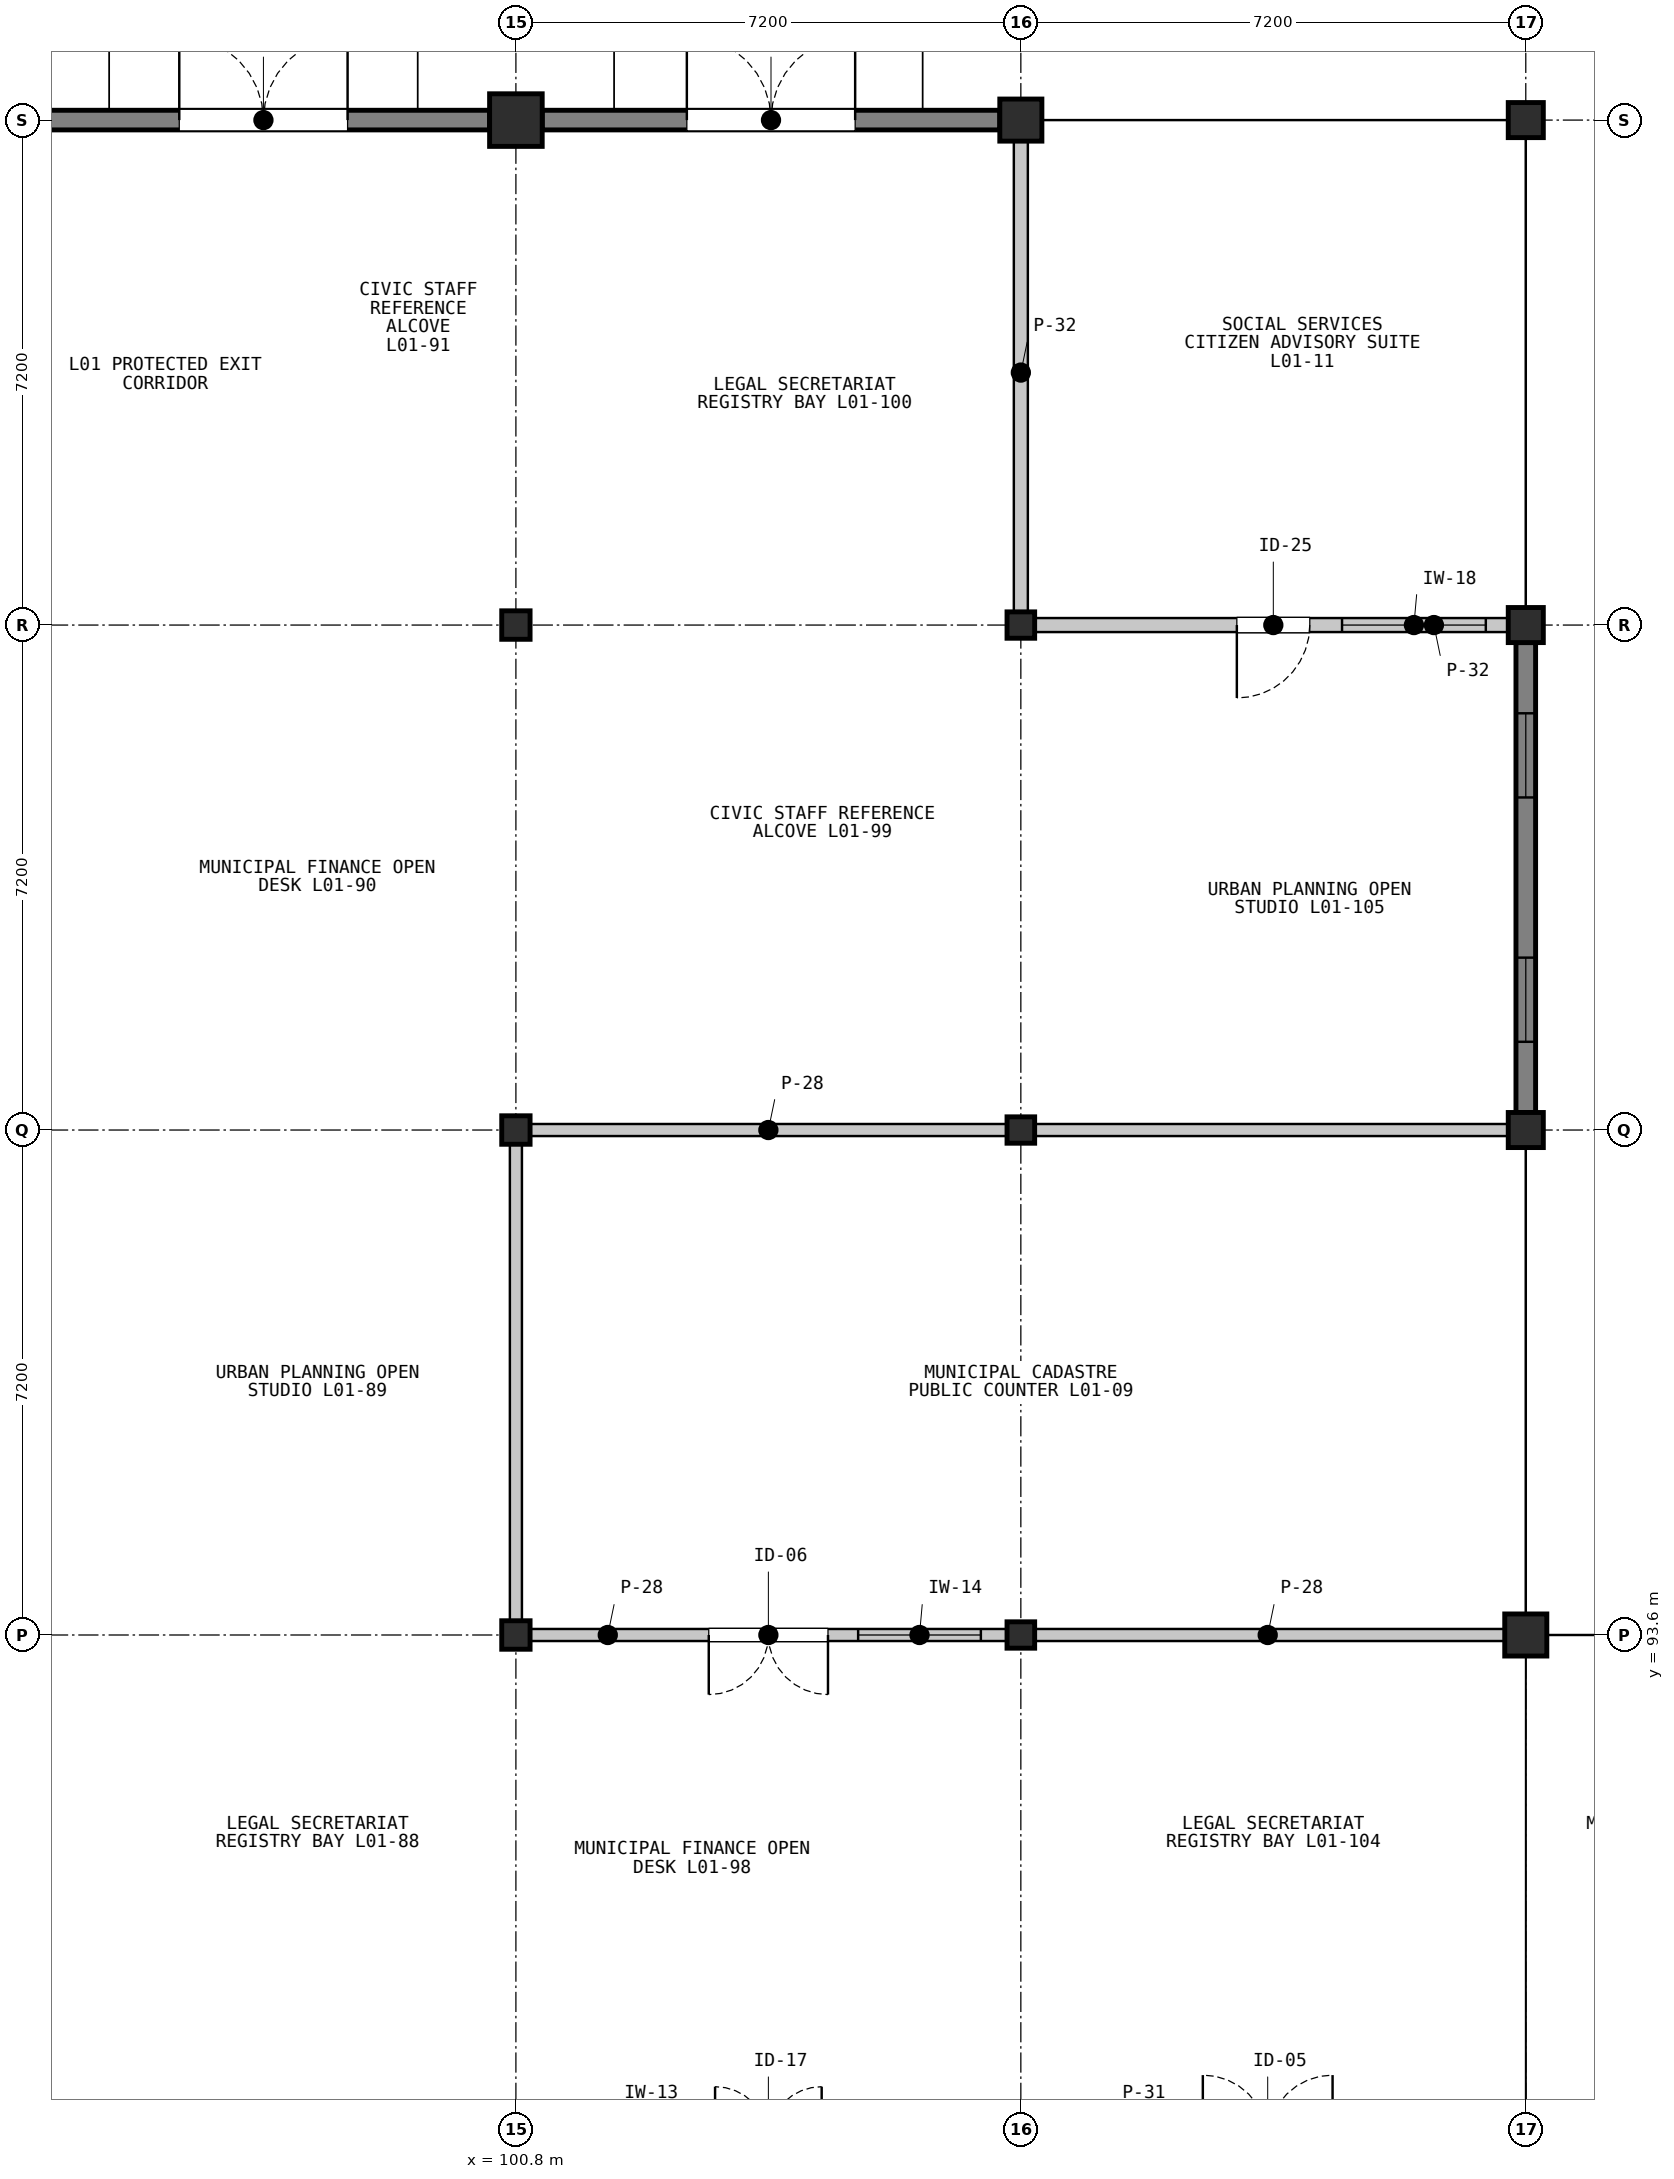
"""IFC4 building model, lengths in metres.
Left out: names, types, materials, properties, quantities, classifications, styles, units other than length and angle.
Written with IfcOpenShell. Run it as: python <this file> out.ifc"""

import sys

from ifc_helpers import new_model, si_unit, direction, frame, frame_2d, origin, origin_2d, place, context, subcontext, project, spatial, rectangle, i_section, extrude, element, fill, save


model = new_model("IFC4")
c1 = context("Model", 3, precision=1e-05, world=origin(), true_north=direction((0.0, 1.0)))
c2 = subcontext(c1, "Body", "Model", "MODEL_VIEW")
j1 = project(units=[si_unit("LENGTHUNIT", "METRE"), si_unit("PLANEANGLEUNIT", "RADIAN")], contexts=[c1])
p1 = place(None, origin())
s1 = spatial("IfcSite", under=j1, at=p1, CompositionType="ELEMENT")
p2 = place(p1, origin())
s2 = spatial("IfcBuilding", under=s1, at=p2, CompositionType="ELEMENT")
p3 = place(p2, origin())
s3 = spatial("IfcBuildingStorey", under=s2, at=p3, CompositionType="ELEMENT", Elevation=0.0)
for number, where, z_axis, x_axis in (
    (1, (100.8, 93.6, 0.0), (0.0, 0.0, 1.0), (1.0, 0.0, 0.0)),
    (2, (100.8, 100.8, 0.0), (0.0, 0.0, 1.0), (1.0, 0.0, 0.0)),
    (3, (100.8, 108.0, 0.0), (0.0, 0.0, 1.0), (1.0, 0.0, 0.0)),
):
    element("IfcColumn", number, at=place(p3, frame(where, z_axis=z_axis, x_axis=x_axis)), inside=s3, PredefinedType="COLUMN", context=c2, shape_type="SweptSolid", body=[
        extrude(i_section(OverallWidth=0.404, OverallDepth=0.406, WebThickness=0.027, FlangeThickness=0.044, FilletRadius=0.015, at=origin_2d()), origin(), (0.0, 0.0, 1.0), 5.4),
    ])
p4 = place(p3, frame((100.8, 115.2, 0.0), z_axis=(0.0, 0.0, 1.0), x_axis=(1.0, 0.0, 0.0)))
e4 = element("IfcColumn", 4, at=p4, inside=s3, PredefinedType="COLUMN", context=c2, shape_type="SweptSolid", body=[
    extrude(rectangle(XDim=0.75, YDim=0.75, at=origin_2d()), origin(), (0.0, 0.0, 1.0), 5.4),
])
for number, where, z_axis, x_axis in (
    (5, (108.0, 93.6, 0.0), (0.0, 0.0, 1.0), (1.0, 0.0, 0.0)),
    (6, (108.0, 100.8, 0.0), (0.0, 0.0, 1.0), (1.0, 0.0, 0.0)),
    (7, (108.0, 108.0, 0.0), (0.0, 0.0, 1.0), (1.0, 0.0, 0.0)),
):
    element("IfcColumn", number, at=place(p3, frame(where, z_axis=z_axis, x_axis=x_axis)), inside=s3, PredefinedType="COLUMN", context=c2, shape_type="SweptSolid", body=[
        extrude(i_section(OverallWidth=0.394, OverallDepth=0.376, WebThickness=0.017, FlangeThickness=0.028, FilletRadius=0.015, at=origin_2d()), origin(), (0.0, 0.0, 1.0), 5.4),
    ])
for number, where, z_axis, x_axis in (
    (8, (108.0, 115.2, 0.0), (0.0, 0.0, 1.0), (1.0, 0.0, 0.0)),
    (9, (115.2, 93.6, 0.0), (0.0, 0.0, 1.0), (1.0, 0.0, 0.0)),
):
    element("IfcColumn", number, at=place(p3, frame(where, z_axis=z_axis, x_axis=x_axis)), inside=s3, PredefinedType="COLUMN", context=c2, shape_type="SweptSolid", body=[
        extrude(rectangle(XDim=0.6, YDim=0.6, at=origin_2d()), origin(), (0.0, 0.0, 1.0), 5.4),
    ])
for number, where, z_axis, x_axis in (
    (10, (115.2, 100.8, 0.0), (0.0, 0.0, 1.0), (1.0, 0.0, 0.0)),
    (11, (115.2, 108.0, 0.0), (0.0, 0.0, 1.0), (1.0, 0.0, 0.0)),
    (12, (115.2, 115.2, 0.0), (0.0, 0.0, 1.0), (1.0, 0.0, 0.0)),
):
    element("IfcColumn", number, at=place(p3, frame(where, z_axis=z_axis, x_axis=x_axis)), inside=s3, PredefinedType="COLUMN", context=c2, shape_type="SweptSolid", body=[
        extrude(rectangle(XDim=0.5, YDim=0.5, at=origin_2d()), origin(), (0.0, 0.0, 1.0), 5.4),
    ])
p5 = place(p3, frame((93.975, 115.2, 0.0), z_axis=(0.0, 0.0, 1.0), x_axis=(1.0, 0.0, 0.0)))
e13 = element("IfcWall", 13, at=p5, inside=s3, PredefinedType="SOLIDWALL", context=c2, shape_type="SweptSolid", body=[
    extrude(rectangle(XDim=6.45, YDim=0.28, at=frame_2d((3.225, 0.0))), origin(), (0.0, 0.0, 1.0), 4.598),
])
p6 = place(p5, frame((2.025, 0.0, 0.0)))
e14 = element("IfcOpeningElement", 14, at=p6, cuts=e13, PredefinedType="OPENING", context=c2, shape_type="SweptSolid", body=[
    extrude(rectangle(XDim=2.4, YDim=2.8, at=frame_2d((1.2, 1.4))), frame((0.0, 0.15, 0.0), z_axis=(0.0, -1.0, 0.0), x_axis=(1.0, 0.0, 0.0)), (0.0, 0.0, 1.0), 0.3),
])
p7 = place(p3, frame((101.175, 115.2, 0.0), z_axis=(0.0, 0.0, 1.0), x_axis=(1.0, 0.0, 0.0)))
e15 = element("IfcWall", 15, at=p7, inside=s3, PredefinedType="SOLIDWALL", context=c2, shape_type="SweptSolid", body=[
    extrude(rectangle(XDim=6.525, YDim=0.28, at=frame_2d((3.262, 0.0))), origin(), (0.0, 0.0, 1.0), 4.598),
])
p8 = place(p7, frame((2.062, 0.0, 0.0)))
e16 = element("IfcOpeningElement", 16, at=p8, cuts=e15, PredefinedType="OPENING", context=c2, shape_type="SweptSolid", body=[
    extrude(rectangle(XDim=2.4, YDim=2.8, at=frame_2d((1.2, 1.4))), frame((0.0, 0.15, 0.0), z_axis=(0.0, -1.0, 0.0), x_axis=(1.0, 0.0, 0.0)), (0.0, 0.0, 1.0), 0.3),
])
p9 = place(p3, frame((115.2, 107.75, 0.0), z_axis=(0.0, 0.0, 1.0), x_axis=(0.0, -1.0, 0.0)))
e17 = element("IfcWall", 17, at=p9, inside=s3, PredefinedType="SOLIDWALL", context=c2, shape_type="SweptSolid", body=[
    extrude(rectangle(XDim=6.7, YDim=0.28, at=frame_2d((3.35, 0.0))), origin(), (0.0, 0.0, 1.0), 4.667),
])
p10 = place(p9, frame((1.008, 0.0, 0.95)))
e18 = element("IfcOpeningElement", 18, at=p10, cuts=e17, PredefinedType="OPENING", context=c2, shape_type="SweptSolid", body=[
    extrude(rectangle(XDim=1.2, YDim=1.7, at=frame_2d((0.6, 0.85))), frame((0.0, 0.15, 0.0), z_axis=(0.0, -1.0, 0.0), x_axis=(1.0, 0.0, 0.0)), (0.0, 0.0, 1.0), 0.3),
])
p11 = place(p9, frame((4.492, 0.0, 0.95)))
e19 = element("IfcOpeningElement", 19, at=p11, cuts=e17, PredefinedType="OPENING", context=c2, shape_type="SweptSolid", body=[
    extrude(rectangle(XDim=1.2, YDim=1.7, at=frame_2d((0.6, 0.85))), frame((0.0, 0.15, 0.0), z_axis=(0.0, -1.0, 0.0), x_axis=(1.0, 0.0, 0.0)), (0.0, 0.0, 1.0), 0.3),
])
p12 = place(p3, frame((107.88, 93.6, 0.0), z_axis=(0.0, 0.0, 1.0), x_axis=(-1.0, 0.0, 0.0)))
e20 = element("IfcWall", 20, at=p12, inside=s3, PredefinedType="PARTITIONING", context=c2, shape_type="SweptSolid", body=[
    extrude(rectangle(XDim=6.96, YDim=0.172, at=frame_2d((3.48, 0.0))), origin(), (0.0, 0.0, 1.0), 4.588),
])
p13 = place(p12, frame((2.63, 0.0, 0.0)))
e21 = element("IfcOpeningElement", 21, at=p13, cuts=e20, PredefinedType="OPENING", context=c2, shape_type="SweptSolid", body=[
    extrude(rectangle(XDim=1.7, YDim=2.35, at=frame_2d((0.85, 1.175))), frame((0.0, 0.096, 0.0), z_axis=(0.0, -1.0, 0.0), x_axis=(1.0, 0.0, 0.0)), (0.0, 0.0, 1.0), 0.192),
])
p14 = place(p12, frame((0.45, 0.0, 1.05)))
e22 = element("IfcOpeningElement", 22, at=p14, cuts=e20, PredefinedType="OPENING", context=c2, shape_type="SweptSolid", body=[
    extrude(rectangle(XDim=1.75, YDim=1.18, at=frame_2d((0.875, 0.59))), frame((0.0, 0.096, 0.0), z_axis=(0.0, -1.0, 0.0), x_axis=(1.0, 0.0, 0.0)), (0.0, 0.0, 1.0), 0.192),
])
p15 = place(p3, frame((114.92, 93.6, 0.0), z_axis=(0.0, 0.0, 1.0), x_axis=(-1.0, 0.0, 0.0)))
e23 = element("IfcWall", 23, at=p15, inside=s3, PredefinedType="PARTITIONING", context=c2, shape_type="SweptSolid", body=[
    extrude(rectangle(XDim=6.8, YDim=0.172, at=frame_2d((3.4, 0.0))), origin(), (0.0, 0.0, 1.0), 4.588),
])
for number, where, z_axis, x_axis in (
    (24, (100.92, 100.8, 0.0), (0.0, 0.0, 1.0), (1.0, 0.0, 0.0)),
    (25, (108.12, 100.8, 0.0), (0.0, 0.0, 1.0), (1.0, 0.0, 0.0)),
    (26, (100.8, 93.72, 0.0), (0.0, 0.0, 1.0), (0.0, 1.0, 0.0)),
):
    element("IfcWall", number, at=place(p3, frame(where, z_axis=z_axis, x_axis=x_axis)), inside=s3, PredefinedType="PARTITIONING", context=c2, shape_type="SweptSolid", body=[
        extrude(rectangle(XDim=6.96, YDim=0.172, at=frame_2d((3.48, 0.0))), origin(), (0.0, 0.0, 1.0), 4.588),
    ])
p16 = place(p3, frame((115.08, 108.0, 0.0), z_axis=(0.0, 0.0, 1.0), x_axis=(-1.0, 0.0, 0.0)))
e27 = element("IfcWall", 27, at=p16, inside=s3, PredefinedType="PARTITIONING", context=c2, shape_type="SweptSolid", body=[
    extrude(rectangle(XDim=6.96, YDim=0.2, at=frame_2d((3.48, 0.0))), origin(), (0.0, 0.0, 1.0), 4.588),
])
p17 = place(p16, frame((2.96, 0.0, 0.0)))
e28 = element("IfcOpeningElement", 28, at=p17, cuts=e27, PredefinedType="OPENING", context=c2, shape_type="SweptSolid", body=[
    extrude(rectangle(XDim=1.04, YDim=2.18, at=frame_2d((0.52, 1.09))), frame((0.0, 0.11, 0.0), z_axis=(0.0, -1.0, 0.0), x_axis=(1.0, 0.0, 0.0)), (0.0, 0.0, 1.0), 0.22),
])
p18 = place(p16, frame((0.45, 0.0, 1.05)))
e29 = element("IfcOpeningElement", 29, at=p18, cuts=e27, PredefinedType="OPENING", context=c2, shape_type="SweptSolid", body=[
    extrude(rectangle(XDim=2.05, YDim=1.22, at=frame_2d((1.025, 0.61))), frame((0.0, 0.11, 0.0), z_axis=(0.0, -1.0, 0.0), x_axis=(1.0, 0.0, 0.0)), (0.0, 0.0, 1.0), 0.22),
])
p19 = place(p3, frame((108.0, 108.12, 0.0), z_axis=(0.0, 0.0, 1.0), x_axis=(0.0, 1.0, 0.0)))
e30 = element("IfcWall", 30, at=p19, inside=s3, PredefinedType="PARTITIONING", context=c2, shape_type="SweptSolid", body=[
    extrude(rectangle(XDim=6.96, YDim=0.2, at=frame_2d((3.48, 0.0))), origin(), (0.0, 0.0, 1.0), 4.588),
])
p20 = place(p6, origin())
e31 = element("IfcDoor", 31, at=p20, inside=s3, OperationType="DOUBLE_DOOR_SINGLE_SWING", PredefinedType="DOOR", context=c2, shape_type="SweptSolid", body=[
    extrude(rectangle(XDim=2.4, YDim=2.8, at=frame_2d((1.2, 1.4))), frame((0.0, 0.025, 0.0), z_axis=(0.0, -1.0, 0.0), x_axis=(1.0, 0.0, 0.0)), (0.0, 0.0, 1.0), 0.05),
])
fill(e14, e31)
p21 = place(p8, origin())
e32 = element("IfcDoor", 32, at=p21, inside=s3, OperationType="DOUBLE_DOOR_SINGLE_SWING", PredefinedType="DOOR", context=c2, shape_type="SweptSolid", body=[
    extrude(rectangle(XDim=2.4, YDim=2.8, at=frame_2d((1.2, 1.4))), frame((0.0, 0.025, 0.0), z_axis=(0.0, -1.0, 0.0), x_axis=(1.0, 0.0, 0.0)), (0.0, 0.0, 1.0), 0.05),
])
fill(e16, e32)
p22 = place(p10, origin())
e33 = element("IfcWindow", 33, at=p22, inside=s3, PartitioningType="SINGLE_PANEL", PredefinedType="WINDOW", context=c2, shape_type="SweptSolid", body=[
    extrude(rectangle(XDim=1.2, YDim=1.7, at=frame_2d((0.6, 0.85))), frame((0.0, 0.03, 0.0), z_axis=(0.0, -1.0, 0.0), x_axis=(1.0, 0.0, 0.0)), (0.0, 0.0, 1.0), 0.06),
])
fill(e18, e33)
p23 = place(p11, origin())
e34 = element("IfcWindow", 34, at=p23, inside=s3, PartitioningType="SINGLE_PANEL", PredefinedType="WINDOW", context=c2, shape_type="SweptSolid", body=[
    extrude(rectangle(XDim=1.2, YDim=1.7, at=frame_2d((0.6, 0.85))), frame((0.0, 0.03, 0.0), z_axis=(0.0, -1.0, 0.0), x_axis=(1.0, 0.0, 0.0)), (0.0, 0.0, 1.0), 0.06),
])
fill(e19, e34)
p24 = place(p13, origin())
e35 = element("IfcDoor", 35, at=p24, inside=s3, OperationType="DOUBLE_DOOR_SINGLE_SWING", PredefinedType="DOOR", context=c2, shape_type="SweptSolid", body=[
    extrude(rectangle(XDim=1.7, YDim=2.35, at=frame_2d((0.85, 1.175))), frame((0.0, 0.025, 0.0), z_axis=(0.0, -1.0, 0.0), x_axis=(1.0, 0.0, 0.0)), (0.0, 0.0, 1.0), 0.05),
])
fill(e21, e35)
p25 = place(p14, origin())
e36 = element("IfcWindow", 36, at=p25, inside=s3, PartitioningType="SINGLE_PANEL", PredefinedType="WINDOW", context=c2, shape_type="SweptSolid", body=[
    extrude(rectangle(XDim=1.75, YDim=1.18, at=frame_2d((0.875, 0.59))), frame((0.0, 0.03, 0.0), z_axis=(0.0, -1.0, 0.0), x_axis=(1.0, 0.0, 0.0)), (0.0, 0.0, 1.0), 0.06),
])
fill(e22, e36)
p26 = place(p17, origin())
e37 = element("IfcDoor", 37, at=p26, inside=s3, OperationType="SINGLE_SWING_RIGHT", PredefinedType="DOOR", context=c2, shape_type="SweptSolid", body=[
    extrude(rectangle(XDim=1.04, YDim=2.18, at=frame_2d((0.52, 1.09))), frame((0.0, 0.025, 0.0), z_axis=(0.0, -1.0, 0.0), x_axis=(1.0, 0.0, 0.0)), (0.0, 0.0, 1.0), 0.05),
])
fill(e28, e37)
p27 = place(p18, origin())
e38 = element("IfcWindow", 38, at=p27, inside=s3, PartitioningType="SINGLE_PANEL", PredefinedType="WINDOW", context=c2, shape_type="SweptSolid", body=[
    extrude(rectangle(XDim=2.05, YDim=1.22, at=frame_2d((1.025, 0.61))), frame((0.0, 0.03, 0.0), z_axis=(0.0, -1.0, 0.0), x_axis=(1.0, 0.0, 0.0)), (0.0, 0.0, 1.0), 0.06),
])
fill(e29, e38)
save(model, sys.argv[1])
